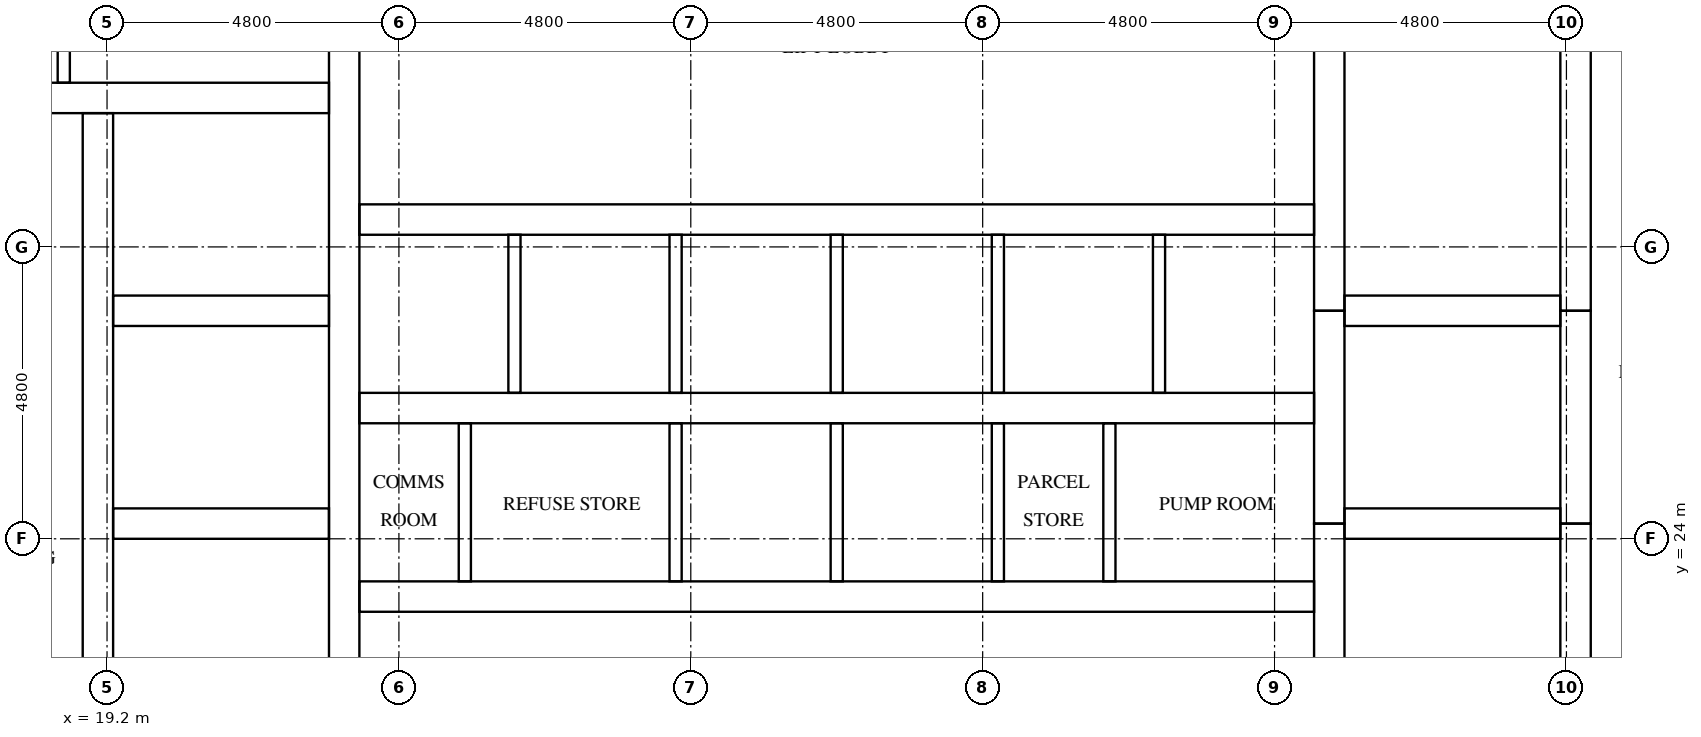
"""IFC4 building model, lengths in metres.
Left out: names, types, materials, properties, quantities, classifications, styles, units other than length and angle.
Written with IfcOpenShell. Run it as: python <this file> out.ifc"""

import sys

from ifc_helpers import new_model, si_unit, direction, frame, frame_2d, origin, place, context, subcontext, project, spatial, rectangle, extrude, element, fill, save


model = new_model("IFC4")
c1 = context("Model", 3, precision=1e-05, world=origin(), true_north=direction((0.0, 1.0)))
c2 = subcontext(c1, "Body", "Model", "MODEL_VIEW")
j1 = project(units=[si_unit("LENGTHUNIT", "METRE"), si_unit("PLANEANGLEUNIT", "RADIAN")], contexts=[c1])
p1 = place(None, origin())
s1 = spatial("IfcSite", under=j1, at=p1, CompositionType="ELEMENT")
p2 = place(p1, origin())
s2 = spatial("IfcBuilding", under=s1, at=p2, CompositionType="ELEMENT")
p3 = place(p2, frame((0.0, 0.0, 212.3)))
s3 = spatial("IfcBuildingStorey", under=s2, at=p3, CompositionType="ELEMENT", Elevation=212.3)
p4 = place(p3, frame((19.05, 15.7, 0.0), z_axis=(0.0, 0.0, 1.0), x_axis=(0.0, 1.0, 0.0)))
e1 = element("IfcWall", 1, at=p4, inside=s3, PredefinedType="SHEAR", context=c2, shape_type="SweptSolid", body=[
    extrude(rectangle(XDim=15.3, YDim=0.5, at=frame_2d((7.65, 0.0))), origin(), (0.0, 0.0, 1.0), 3.2),
])
p5 = place(p4, frame((9.75, 0.0, 0.0)))
e2 = element("IfcOpeningElement", 2, at=p5, cuts=e1, PredefinedType="OPENING", context=c2, shape_type="SweptSolid", body=[
    extrude(rectangle(XDim=1.1, YDim=2.1, at=frame_2d((0.55, 1.05))), frame((0.0, 0.26, 0.0), z_axis=(0.0, -1.0, 0.0), x_axis=(1.0, 0.0, 0.0)), (0.0, 0.0, 1.0), 0.52),
])
p6 = place(p4, frame((13.25, 0.0, 0.0)))
e3 = element("IfcOpeningElement", 3, at=p6, cuts=e1, PredefinedType="OPENING", context=c2, shape_type="SweptSolid", body=[
    extrude(rectangle(XDim=1.1, YDim=2.1, at=frame_2d((0.55, 1.05))), frame((0.0, 0.26, 0.0), z_axis=(0.0, -1.0, 0.0), x_axis=(1.0, 0.0, 0.0)), (0.0, 0.0, 1.0), 0.52),
])
p7 = place(p4, frame((0.5, 0.0, 0.0)))
e4 = element("IfcOpeningElement", 4, at=p7, cuts=e1, PredefinedType="OPENING", context=c2, shape_type="SweptSolid", body=[
    extrude(rectangle(XDim=1.2, YDim=2.1, at=frame_2d((0.6, 1.05))), frame((0.0, 0.26, 0.0), z_axis=(0.0, -1.0, 0.0), x_axis=(1.0, 0.0, 0.0)), (0.0, 0.0, 1.0), 0.52),
])
p8 = place(p3, frame((23.1, 15.7, 0.0), z_axis=(0.0, 0.0, 1.0), x_axis=(0.0, 1.0, 0.0)))
e5 = element("IfcWall", 5, at=p8, inside=s3, PredefinedType="SHEAR", context=c2, shape_type="SweptSolid", body=[
    extrude(rectangle(XDim=21.4, YDim=0.5, at=frame_2d((10.7, 0.0))), origin(), (0.0, 0.0, 1.0), 3.2),
])
p9 = place(p3, frame((39.3, 15.7, 0.0), z_axis=(0.0, 0.0, 1.0), x_axis=(0.0, 1.0, 0.0)))
e6 = element("IfcWall", 6, at=p9, inside=s3, PredefinedType="SHEAR", context=c2, shape_type="SweptSolid", body=[
    extrude(rectangle(XDim=8.55, YDim=0.5, at=frame_2d((4.275, 0.0))), origin(), (0.0, 0.0, 1.0), 3.2),
])
p10 = place(p3, frame((39.3, 24.25, 0.0), z_axis=(0.0, 0.0, 1.0), x_axis=(0.0, 1.0, 0.0)))
e7 = element("IfcWall", 7, at=p10, inside=s3, PredefinedType="SHEAR", context=c2, shape_type="SweptSolid", body=[
    extrude(rectangle(XDim=3.5, YDim=0.5, at=frame_2d((1.75, 0.0))), origin(), (0.0, 0.0, 1.0), 3.2),
])
p11 = place(p3, frame((39.3, 27.75, 0.0), z_axis=(0.0, 0.0, 1.0), x_axis=(0.0, 1.0, 0.0)))
e8 = element("IfcWall", 8, at=p11, inside=s3, PredefinedType="SHEAR", context=c2, shape_type="SweptSolid", body=[
    extrude(rectangle(XDim=9.35, YDim=0.5, at=frame_2d((4.675, 0.0))), origin(), (0.0, 0.0, 1.0), 3.2),
])
p12 = place(p3, frame((43.35, 15.7, 0.0), z_axis=(0.0, 0.0, 1.0), x_axis=(0.0, 1.0, 0.0)))
e9 = element("IfcWall", 9, at=p12, inside=s3, PredefinedType="SHEAR", context=c2, shape_type="SweptSolid", body=[
    extrude(rectangle(XDim=8.55, YDim=0.5, at=frame_2d((4.275, 0.0))), origin(), (0.0, 0.0, 1.0), 3.2),
])
p13 = place(p12, frame((0.5, 0.0, 0.0)))
e10 = element("IfcOpeningElement", 10, at=p13, cuts=e9, PredefinedType="OPENING", context=c2, shape_type="SweptSolid", body=[
    extrude(rectangle(XDim=1.2, YDim=2.1, at=frame_2d((0.6, 1.05))), frame((0.0, 0.26, 0.0), z_axis=(0.0, -1.0, 0.0), x_axis=(1.0, 0.0, 0.0)), (0.0, 0.0, 1.0), 0.52),
])
p14 = place(p3, frame((43.35, 24.25, 0.0), z_axis=(0.0, 0.0, 1.0), x_axis=(0.0, 1.0, 0.0)))
e11 = element("IfcWall", 11, at=p14, inside=s3, PredefinedType="SHEAR", context=c2, shape_type="SweptSolid", body=[
    extrude(rectangle(XDim=3.5, YDim=0.5, at=frame_2d((1.75, 0.0))), origin(), (0.0, 0.0, 1.0), 3.2),
])
p15 = place(p14, frame((1.2, 0.0, 0.0)))
e12 = element("IfcOpeningElement", 12, at=p15, cuts=e11, PredefinedType="OPENING", context=c2, shape_type="SweptSolid", body=[
    extrude(rectangle(XDim=1.1, YDim=2.1, at=frame_2d((0.55, 1.05))), frame((0.0, 0.26, 0.0), z_axis=(0.0, -1.0, 0.0), x_axis=(1.0, 0.0, 0.0)), (0.0, 0.0, 1.0), 0.52),
])
p16 = place(p3, frame((43.35, 27.75, 0.0), z_axis=(0.0, 0.0, 1.0), x_axis=(0.0, 1.0, 0.0)))
e13 = element("IfcWall", 13, at=p16, inside=s3, PredefinedType="SHEAR", context=c2, shape_type="SweptSolid", body=[
    extrude(rectangle(XDim=9.35, YDim=0.5, at=frame_2d((4.675, 0.0))), origin(), (0.0, 0.0, 1.0), 3.2),
])
p17 = place(p16, frame((7.65, 0.0, 0.0)))
e14 = element("IfcOpeningElement", 14, at=p17, cuts=e13, PredefinedType="OPENING", context=c2, shape_type="SweptSolid", body=[
    extrude(rectangle(XDim=1.2, YDim=2.1, at=frame_2d((0.6, 1.05))), frame((0.0, 0.26, 0.0), z_axis=(0.0, -1.0, 0.0), x_axis=(1.0, 0.0, 0.0)), (0.0, 0.0, 1.0), 0.52),
])
for number, where, z_axis, x_axis in (
    (15, (19.3, 24.25, 0.0), (0.0, 0.0, 1.0), (1.0, 0.0, 0.0)),
    (16, (19.3, 27.75, 0.0), (0.0, 0.0, 1.0), (1.0, 0.0, 0.0)),
):
    element("IfcWall", number, at=place(p3, frame(where, z_axis=z_axis, x_axis=x_axis)), inside=s3, PredefinedType="SHEAR", context=c2, shape_type="SweptSolid", body=[
        extrude(rectangle(XDim=3.55, YDim=0.5, at=frame_2d((1.775, 0.0))), origin(), (0.0, 0.0, 1.0), 3.2),
    ])
p18 = place(p3, frame((15.7, 31.25, 0.0), z_axis=(0.0, 0.0, 1.0), x_axis=(1.0, 0.0, 0.0)))
e17 = element("IfcWall", 17, at=p18, inside=s3, PredefinedType="SHEAR", context=c2, shape_type="SweptSolid", body=[
    extrude(rectangle(XDim=7.15, YDim=0.5, at=frame_2d((3.575, 0.0))), origin(), (0.0, 0.0, 1.0), 3.2),
])
for number, where, z_axis, x_axis in (
    (18, (39.55, 24.25, 0.0), (0.0, 0.0, 1.0), (1.0, 0.0, 0.0)),
    (19, (39.55, 27.75, 0.0), (0.0, 0.0, 1.0), (1.0, 0.0, 0.0)),
):
    element("IfcWall", number, at=place(p3, frame(where, z_axis=z_axis, x_axis=x_axis)), inside=s3, PredefinedType="SHEAR", context=c2, shape_type="SweptSolid", body=[
        extrude(rectangle(XDim=3.55, YDim=0.5, at=frame_2d((1.775, 0.0))), origin(), (0.0, 0.0, 1.0), 3.2),
    ])
p19 = place(p3, frame((23.35, 23.05, 0.0), z_axis=(0.0, 0.0, 1.0), x_axis=(1.0, 0.0, 0.0)))
e20 = element("IfcWall", 20, at=p19, inside=s3, PredefinedType="SHEAR", context=c2, shape_type="SweptSolid", body=[
    extrude(rectangle(XDim=15.7, YDim=0.5, at=frame_2d((7.85, 0.0))), origin(), (0.0, 0.0, 1.0), 3.2),
])
p20 = place(p19, frame((0.317, 0.0, 0.0)))
e21 = element("IfcOpeningElement", 21, at=p20, cuts=e20, PredefinedType="OPENING", context=c2, shape_type="SweptSolid", body=[
    extrude(rectangle(XDim=1.0, YDim=2.1, at=frame_2d((0.5, 1.05))), frame((0.0, 0.26, 0.0), z_axis=(0.0, -1.0, 0.0), x_axis=(1.0, 0.0, 0.0)), (0.0, 0.0, 1.0), 0.52),
])
p21 = place(p19, frame((2.967, 0.0, 0.0)))
e22 = element("IfcOpeningElement", 22, at=p21, cuts=e20, PredefinedType="OPENING", context=c2, shape_type="SweptSolid", body=[
    extrude(rectangle(XDim=1.0, YDim=2.1, at=frame_2d((0.5, 1.05))), frame((0.0, 0.26, 0.0), z_axis=(0.0, -1.0, 0.0), x_axis=(1.0, 0.0, 0.0)), (0.0, 0.0, 1.0), 0.52),
])
p22 = place(p19, frame((10.917, 0.0, 0.0)))
e23 = element("IfcOpeningElement", 23, at=p22, cuts=e20, PredefinedType="OPENING", context=c2, shape_type="SweptSolid", body=[
    extrude(rectangle(XDim=1.0, YDim=2.1, at=frame_2d((0.5, 1.05))), frame((0.0, 0.26, 0.0), z_axis=(0.0, -1.0, 0.0), x_axis=(1.0, 0.0, 0.0)), (0.0, 0.0, 1.0), 0.52),
])
p23 = place(p19, frame((13.567, 0.0, 0.0)))
e24 = element("IfcOpeningElement", 24, at=p23, cuts=e20, PredefinedType="OPENING", context=c2, shape_type="SweptSolid", body=[
    extrude(rectangle(XDim=1.0, YDim=2.1, at=frame_2d((0.5, 1.05))), frame((0.0, 0.26, 0.0), z_axis=(0.0, -1.0, 0.0), x_axis=(1.0, 0.0, 0.0)), (0.0, 0.0, 1.0), 0.52),
])
p24 = place(p3, frame((23.35, 26.15, 0.0), z_axis=(0.0, 0.0, 1.0), x_axis=(1.0, 0.0, 0.0)))
e25 = element("IfcWall", 25, at=p24, inside=s3, PredefinedType="SHEAR", context=c2, shape_type="SweptSolid", body=[
    extrude(rectangle(XDim=15.7, YDim=0.5, at=frame_2d((7.85, 0.0))), origin(), (0.0, 0.0, 1.0), 3.2),
])
p25 = place(p3, frame((23.35, 29.25, 0.0), z_axis=(0.0, 0.0, 1.0), x_axis=(1.0, 0.0, 0.0)))
e26 = element("IfcWall", 26, at=p25, inside=s3, PredefinedType="SHEAR", context=c2, shape_type="SweptSolid", body=[
    extrude(rectangle(XDim=15.7, YDim=0.5, at=frame_2d((7.85, 0.0))), origin(), (0.0, 0.0, 1.0), 3.2),
])
p26 = place(p25, frame((0.675, 0.0, 0.0)))
e27 = element("IfcOpeningElement", 27, at=p26, cuts=e26, PredefinedType="OPENING", context=c2, shape_type="SweptSolid", body=[
    extrude(rectangle(XDim=1.1, YDim=2.1, at=frame_2d((0.55, 1.05))), frame((0.0, 0.26, 0.0), z_axis=(0.0, -1.0, 0.0), x_axis=(1.0, 0.0, 0.0)), (0.0, 0.0, 1.0), 0.52),
])
p27 = place(p25, frame((3.325, 0.0, 0.0)))
e28 = element("IfcOpeningElement", 28, at=p27, cuts=e26, PredefinedType="OPENING", context=c2, shape_type="SweptSolid", body=[
    extrude(rectangle(XDim=1.1, YDim=2.1, at=frame_2d((0.55, 1.05))), frame((0.0, 0.26, 0.0), z_axis=(0.0, -1.0, 0.0), x_axis=(1.0, 0.0, 0.0)), (0.0, 0.0, 1.0), 0.52),
])
p28 = place(p25, frame((5.975, 0.0, 0.0)))
e29 = element("IfcOpeningElement", 29, at=p28, cuts=e26, PredefinedType="OPENING", context=c2, shape_type="SweptSolid", body=[
    extrude(rectangle(XDim=1.1, YDim=2.1, at=frame_2d((0.55, 1.05))), frame((0.0, 0.26, 0.0), z_axis=(0.0, -1.0, 0.0), x_axis=(1.0, 0.0, 0.0)), (0.0, 0.0, 1.0), 0.52),
])
p29 = place(p25, frame((8.625, 0.0, 0.0)))
e30 = element("IfcOpeningElement", 30, at=p29, cuts=e26, PredefinedType="OPENING", context=c2, shape_type="SweptSolid", body=[
    extrude(rectangle(XDim=1.1, YDim=2.1, at=frame_2d((0.55, 1.05))), frame((0.0, 0.26, 0.0), z_axis=(0.0, -1.0, 0.0), x_axis=(1.0, 0.0, 0.0)), (0.0, 0.0, 1.0), 0.52),
])
p30 = place(p25, frame((11.275, 0.0, 0.0)))
e31 = element("IfcOpeningElement", 31, at=p30, cuts=e26, PredefinedType="OPENING", context=c2, shape_type="SweptSolid", body=[
    extrude(rectangle(XDim=1.1, YDim=2.1, at=frame_2d((0.55, 1.05))), frame((0.0, 0.26, 0.0), z_axis=(0.0, -1.0, 0.0), x_axis=(1.0, 0.0, 0.0)), (0.0, 0.0, 1.0), 0.52),
])
p31 = place(p25, frame((13.925, 0.0, 0.0)))
e32 = element("IfcOpeningElement", 32, at=p31, cuts=e26, PredefinedType="OPENING", context=c2, shape_type="SweptSolid", body=[
    extrude(rectangle(XDim=1.1, YDim=2.1, at=frame_2d((0.55, 1.05))), frame((0.0, 0.26, 0.0), z_axis=(0.0, -1.0, 0.0), x_axis=(1.0, 0.0, 0.0)), (0.0, 0.0, 1.0), 0.52),
])
p32 = place(p3, frame((25.9, 26.4, 0.0), z_axis=(0.0, 0.0, 1.0), x_axis=(0.0, 1.0, 0.0)))
e33 = element("IfcWall", 33, at=p32, inside=s3, PredefinedType="SOLIDWALL", context=c2, shape_type="SweptSolid", body=[
    extrude(rectangle(XDim=2.6, YDim=0.2, at=frame_2d((1.3, 0.0))), origin(), (0.0, 0.0, 1.0), 3.2),
])
p33 = place(p3, frame((28.55, 23.3, 0.0), z_axis=(0.0, 0.0, 1.0), x_axis=(0.0, 1.0, 0.0)))
e34 = element("IfcWall", 34, at=p33, inside=s3, PredefinedType="SOLIDWALL", context=c2, shape_type="SweptSolid", body=[
    extrude(rectangle(XDim=2.6, YDim=0.2, at=frame_2d((1.3, 0.0))), origin(), (0.0, 0.0, 1.0), 3.2),
])
p34 = place(p3, frame((28.55, 26.4, 0.0), z_axis=(0.0, 0.0, 1.0), x_axis=(0.0, 1.0, 0.0)))
e35 = element("IfcWall", 35, at=p34, inside=s3, PredefinedType="SOLIDWALL", context=c2, shape_type="SweptSolid", body=[
    extrude(rectangle(XDim=2.6, YDim=0.2, at=frame_2d((1.3, 0.0))), origin(), (0.0, 0.0, 1.0), 3.2),
])
p35 = place(p3, frame((31.2, 23.3, 0.0), z_axis=(0.0, 0.0, 1.0), x_axis=(0.0, 1.0, 0.0)))
e36 = element("IfcWall", 36, at=p35, inside=s3, PredefinedType="SOLIDWALL", context=c2, shape_type="SweptSolid", body=[
    extrude(rectangle(XDim=2.6, YDim=0.2, at=frame_2d((1.3, 0.0))), origin(), (0.0, 0.0, 1.0), 3.2),
])
p36 = place(p3, frame((31.2, 26.4, 0.0), z_axis=(0.0, 0.0, 1.0), x_axis=(0.0, 1.0, 0.0)))
e37 = element("IfcWall", 37, at=p36, inside=s3, PredefinedType="SOLIDWALL", context=c2, shape_type="SweptSolid", body=[
    extrude(rectangle(XDim=2.6, YDim=0.2, at=frame_2d((1.3, 0.0))), origin(), (0.0, 0.0, 1.0), 3.2),
])
p37 = place(p3, frame((33.85, 23.3, 0.0), z_axis=(0.0, 0.0, 1.0), x_axis=(0.0, 1.0, 0.0)))
e38 = element("IfcWall", 38, at=p37, inside=s3, PredefinedType="SOLIDWALL", context=c2, shape_type="SweptSolid", body=[
    extrude(rectangle(XDim=2.6, YDim=0.2, at=frame_2d((1.3, 0.0))), origin(), (0.0, 0.0, 1.0), 3.2),
])
for number, where, z_axis, x_axis in (
    (39, (33.85, 26.4, 0.0), (0.0, 0.0, 1.0), (0.0, 1.0, 0.0)),
    (40, (36.5, 26.4, 0.0), (0.0, 0.0, 1.0), (0.0, 1.0, 0.0)),
):
    element("IfcWall", number, at=place(p3, frame(where, z_axis=z_axis, x_axis=x_axis)), inside=s3, PredefinedType="SOLIDWALL", context=c2, shape_type="SweptSolid", body=[
        extrude(rectangle(XDim=2.6, YDim=0.2, at=frame_2d((1.3, 0.0))), origin(), (0.0, 0.0, 1.0), 3.2),
    ])
p38 = place(p3, frame((18.489, 31.5, 0.0), z_axis=(0.0, 0.0, 1.0), x_axis=(0.0, 1.0, 0.0)))
e41 = element("IfcWall", 41, at=p38, inside=s3, PredefinedType="PARTITIONING", context=c2, shape_type="SweptSolid", body=[
    extrude(rectangle(XDim=5.6, YDim=0.2, at=frame_2d((2.8, 0.0))), origin(), (0.0, 0.0, 1.0), 3.2),
])
for number, where, z_axis, x_axis in (
    (42, (25.084, 23.3, 0.0), (0.0, 0.0, 1.0), (0.0, 1.0, 0.0)),
    (43, (35.684, 23.3, 0.0), (0.0, 0.0, 1.0), (0.0, 1.0, 0.0)),
):
    element("IfcWall", number, at=place(p3, frame(where, z_axis=z_axis, x_axis=x_axis)), inside=s3, PredefinedType="PARTITIONING", context=c2, shape_type="SweptSolid", body=[
        extrude(rectangle(XDim=2.6, YDim=0.2, at=frame_2d((1.3, 0.0))), origin(), (0.0, 0.0, 1.0), 3.2),
    ])
p39 = place(p26, origin())
e44 = element("IfcDoor", 44, at=p39, inside=s3, OperationType="DOUBLE_DOOR_SLIDING", PredefinedType="DOOR", context=c2, shape_type="SweptSolid", body=[
    extrude(rectangle(XDim=1.1, YDim=2.1, at=frame_2d((0.55, 1.05))), frame((0.0, 0.025, 0.0), z_axis=(0.0, -1.0, 0.0), x_axis=(1.0, 0.0, 0.0)), (0.0, 0.0, 1.0), 0.05),
])
fill(e27, e44)
p40 = place(p27, origin())
e45 = element("IfcDoor", 45, at=p40, inside=s3, OperationType="DOUBLE_DOOR_SLIDING", PredefinedType="DOOR", context=c2, shape_type="SweptSolid", body=[
    extrude(rectangle(XDim=1.1, YDim=2.1, at=frame_2d((0.55, 1.05))), frame((0.0, 0.025, 0.0), z_axis=(0.0, -1.0, 0.0), x_axis=(1.0, 0.0, 0.0)), (0.0, 0.0, 1.0), 0.05),
])
fill(e28, e45)
p41 = place(p28, origin())
e46 = element("IfcDoor", 46, at=p41, inside=s3, OperationType="DOUBLE_DOOR_SLIDING", PredefinedType="DOOR", context=c2, shape_type="SweptSolid", body=[
    extrude(rectangle(XDim=1.1, YDim=2.1, at=frame_2d((0.55, 1.05))), frame((0.0, 0.025, 0.0), z_axis=(0.0, -1.0, 0.0), x_axis=(1.0, 0.0, 0.0)), (0.0, 0.0, 1.0), 0.05),
])
fill(e29, e46)
p42 = place(p29, origin())
e47 = element("IfcDoor", 47, at=p42, inside=s3, OperationType="DOUBLE_DOOR_SLIDING", PredefinedType="DOOR", context=c2, shape_type="SweptSolid", body=[
    extrude(rectangle(XDim=1.1, YDim=2.1, at=frame_2d((0.55, 1.05))), frame((0.0, 0.025, 0.0), z_axis=(0.0, -1.0, 0.0), x_axis=(1.0, 0.0, 0.0)), (0.0, 0.0, 1.0), 0.05),
])
fill(e30, e47)
p43 = place(p30, origin())
e48 = element("IfcDoor", 48, at=p43, inside=s3, OperationType="DOUBLE_DOOR_SLIDING", PredefinedType="DOOR", context=c2, shape_type="SweptSolid", body=[
    extrude(rectangle(XDim=1.1, YDim=2.1, at=frame_2d((0.55, 1.05))), frame((0.0, 0.025, 0.0), z_axis=(0.0, -1.0, 0.0), x_axis=(1.0, 0.0, 0.0)), (0.0, 0.0, 1.0), 0.05),
])
fill(e31, e48)
p44 = place(p31, origin())
e49 = element("IfcDoor", 49, at=p44, inside=s3, OperationType="DOUBLE_DOOR_SLIDING", PredefinedType="DOOR", context=c2, shape_type="SweptSolid", body=[
    extrude(rectangle(XDim=1.1, YDim=2.1, at=frame_2d((0.55, 1.05))), frame((0.0, 0.025, 0.0), z_axis=(0.0, -1.0, 0.0), x_axis=(1.0, 0.0, 0.0)), (0.0, 0.0, 1.0), 0.05),
])
fill(e32, e49)
p45 = place(p5, origin())
e50 = element("IfcDoor", 50, at=p45, inside=s3, OperationType="DOUBLE_DOOR_SLIDING", PredefinedType="DOOR", context=c2, shape_type="SweptSolid", body=[
    extrude(rectangle(XDim=1.1, YDim=2.1, at=frame_2d((0.55, 1.05))), frame((0.0, 0.025, 0.0), z_axis=(0.0, -1.0, 0.0), x_axis=(1.0, 0.0, 0.0)), (0.0, 0.0, 1.0), 0.05),
])
fill(e2, e50)
p46 = place(p6, origin())
e51 = element("IfcDoor", 51, at=p46, inside=s3, OperationType="DOUBLE_DOOR_SLIDING", PredefinedType="DOOR", context=c2, shape_type="SweptSolid", body=[
    extrude(rectangle(XDim=1.1, YDim=2.1, at=frame_2d((0.55, 1.05))), frame((0.0, 0.025, 0.0), z_axis=(0.0, -1.0, 0.0), x_axis=(1.0, 0.0, 0.0)), (0.0, 0.0, 1.0), 0.05),
])
fill(e3, e51)
p47 = place(p15, origin())
e52 = element("IfcDoor", 52, at=p47, inside=s3, OperationType="DOUBLE_DOOR_SLIDING", PredefinedType="DOOR", context=c2, shape_type="SweptSolid", body=[
    extrude(rectangle(XDim=1.1, YDim=2.1, at=frame_2d((0.55, 1.05))), frame((0.0, 0.025, 0.0), z_axis=(0.0, -1.0, 0.0), x_axis=(1.0, 0.0, 0.0)), (0.0, 0.0, 1.0), 0.05),
])
fill(e12, e52)
p48 = place(p20, frame((1.0, 0.0, 0.0), z_axis=(0.0, 0.0, 1.0), x_axis=(-1.0, 0.0, 0.0)))
e53 = element("IfcDoor", 53, at=p48, inside=s3, OperationType="SINGLE_SWING_RIGHT", PredefinedType="DOOR", context=c2, shape_type="SweptSolid", body=[
    extrude(rectangle(XDim=1.0, YDim=2.1, at=frame_2d((0.5, 1.05))), frame((0.0, 0.025, 0.0), z_axis=(0.0, -1.0, 0.0), x_axis=(1.0, 0.0, 0.0)), (0.0, 0.0, 1.0), 0.05),
])
fill(e21, e53)
p49 = place(p21, frame((1.0, 0.0, 0.0), z_axis=(0.0, 0.0, 1.0), x_axis=(-1.0, 0.0, 0.0)))
e54 = element("IfcDoor", 54, at=p49, inside=s3, OperationType="SINGLE_SWING_LEFT", PredefinedType="DOOR", context=c2, shape_type="SweptSolid", body=[
    extrude(rectangle(XDim=1.0, YDim=2.1, at=frame_2d((0.5, 1.05))), frame((0.0, 0.025, 0.0), z_axis=(0.0, -1.0, 0.0), x_axis=(1.0, 0.0, 0.0)), (0.0, 0.0, 1.0), 0.05),
])
fill(e22, e54)
p50 = place(p22, frame((1.0, 0.0, 0.0), z_axis=(0.0, 0.0, 1.0), x_axis=(-1.0, 0.0, 0.0)))
e55 = element("IfcDoor", 55, at=p50, inside=s3, OperationType="SINGLE_SWING_RIGHT", PredefinedType="DOOR", context=c2, shape_type="SweptSolid", body=[
    extrude(rectangle(XDim=1.0, YDim=2.1, at=frame_2d((0.5, 1.05))), frame((0.0, 0.025, 0.0), z_axis=(0.0, -1.0, 0.0), x_axis=(1.0, 0.0, 0.0)), (0.0, 0.0, 1.0), 0.05),
])
fill(e23, e55)
p51 = place(p23, frame((1.0, 0.0, 0.0), z_axis=(0.0, 0.0, 1.0), x_axis=(-1.0, 0.0, 0.0)))
e56 = element("IfcDoor", 56, at=p51, inside=s3, OperationType="SINGLE_SWING_LEFT", PredefinedType="DOOR", context=c2, shape_type="SweptSolid", body=[
    extrude(rectangle(XDim=1.0, YDim=2.1, at=frame_2d((0.5, 1.05))), frame((0.0, 0.025, 0.0), z_axis=(0.0, -1.0, 0.0), x_axis=(1.0, 0.0, 0.0)), (0.0, 0.0, 1.0), 0.05),
])
fill(e24, e56)
save(model, sys.argv[1])
